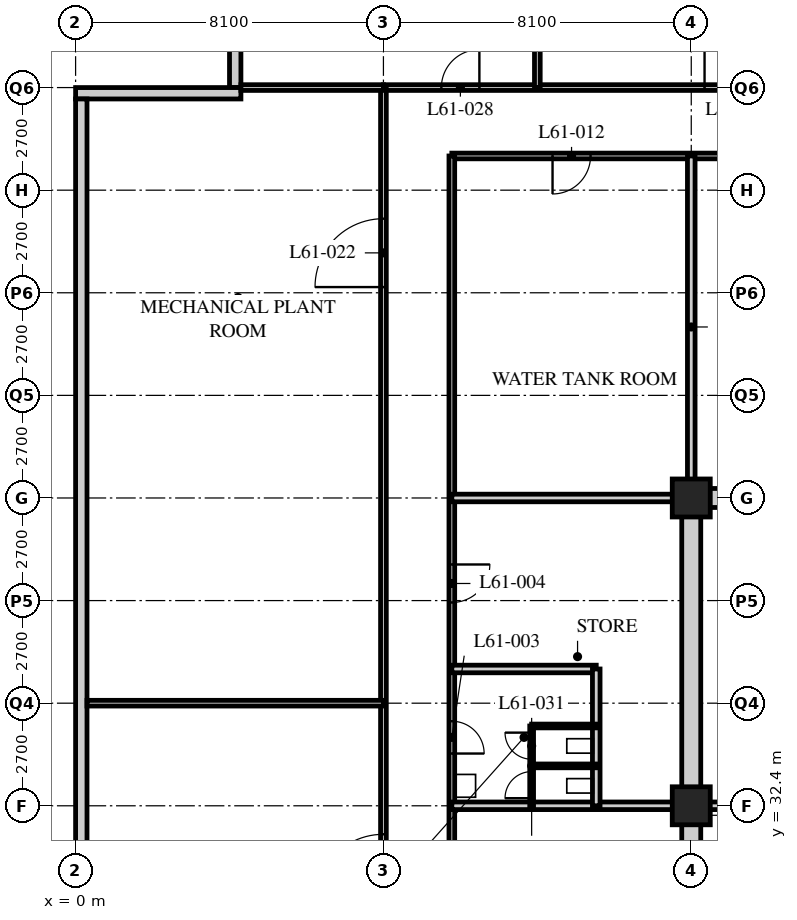
"""IFC4 building model, lengths in metres.
Left out: names, types, materials, properties, quantities, classifications, styles, units other than length and angle.
Written with IfcOpenShell. Run it as: python <this file> out.ifc"""

import sys

from ifc_helpers import new_model, si_unit, direction, frame, frame_2d, origin, origin_2d, place, context, subcontext, project, spatial, rectangle, hollow_rectangle, extrude, element, fill, save


model = new_model("IFC4")
c1 = context("Model", 3, precision=1e-05, world=origin(), true_north=direction((0.0, 1.0)))
c2 = subcontext(c1, "Body", "Model", "MODEL_VIEW")
j1 = project(units=[si_unit("LENGTHUNIT", "METRE"), si_unit("PLANEANGLEUNIT", "RADIAN")], contexts=[c1])
p1 = place(None, origin())
s1 = spatial("IfcSite", under=j1, at=p1, CompositionType="ELEMENT")
p2 = place(p1, origin())
s2 = spatial("IfcBuilding", under=s1, at=p2, CompositionType="ELEMENT")
p3 = place(p2, frame((0.0, 0.0, 235.2)))
s3 = spatial("IfcBuildingStorey", under=s2, at=p3, CompositionType="ELEMENT", Elevation=235.2)
for number, where, z_axis, x_axis in (
    (1, (16.2, 32.4, 0.0), (0.0, 0.0, 1.0), (1.0, 0.0, 0.0)),
    (2, (16.2, 40.5, 0.0), (0.0, 0.0, 1.0), (1.0, 0.0, 0.0)),
):
    element("IfcColumn", number, at=place(p3, frame(where, z_axis=z_axis, x_axis=x_axis)), inside=s3, PredefinedType="COLUMN", context=c2, shape_type="SweptSolid", body=[
        extrude(hollow_rectangle(XDim=1.0, YDim=1.0, WallThickness=0.1, at=origin_2d()), origin(), (0.0, 0.0, 1.0), 7.2),
    ])
p4 = place(p3, frame((4.2, 55.05, 0.0), z_axis=(0.0, 0.0, 1.0), x_axis=(0.0, -1.0, 0.0)))
e3 = element("IfcWall", 3, at=p4, inside=s3, PredefinedType="SOLIDWALL", context=c2, shape_type="SweptSolid", body=[
    extrude(rectangle(XDim=3.75, YDim=0.3, at=frame_2d((1.875, 0.0))), origin(), (0.0, 0.0, 1.0), 6.95),
])
p5 = place(p3, frame((4.35, 51.15, 0.0), z_axis=(0.0, 0.0, 1.0), x_axis=(-1.0, 0.0, 0.0)))
e4 = element("IfcWall", 4, at=p5, inside=s3, PredefinedType="SOLIDWALL", context=c2, shape_type="SweptSolid", body=[
    extrude(rectangle(XDim=4.35, YDim=0.3, at=frame_2d((2.175, 0.0))), origin(), (0.0, 0.0, 1.0), 6.95),
])
p6 = place(p3, frame((0.15, 51.0, 0.0), z_axis=(0.0, 0.0, 1.0), x_axis=(0.0, -1.0, 0.0)))
e5 = element("IfcWall", 5, at=p6, inside=s3, PredefinedType="SOLIDWALL", context=c2, shape_type="SweptSolid", body=[
    extrude(rectangle(XDim=32.1, YDim=0.3, at=frame_2d((16.05, 0.0))), origin(), (0.0, 0.0, 1.0), 5.95),
])
p7 = place(p3, frame((8.1, 51.3, 0.0), z_axis=(0.0, 0.0, 1.0), x_axis=(1.0, 0.0, 0.0)))
e6 = element("IfcWall", 6, at=p7, inside=s3, PredefinedType="PARTITIONING", context=c2, shape_type="SweptSolid", body=[
    extrude(rectangle(XDim=40.5, YDim=0.15, at=frame_2d((20.25, 0.0))), origin(), (0.0, 0.0, 1.0), 6.95),
])
p8 = place(p7, frame((8.45, 0.0, 0.0)))
e7 = element("IfcOpeningElement", 7, at=p8, cuts=e6, PredefinedType="OPENING", context=c2, shape_type="SweptSolid", body=[
    extrude(rectangle(XDim=1.8, YDim=2.4, at=frame_2d((0.9, 1.2))), frame((0.0, 0.085, 0.0), z_axis=(0.0, -1.0, 0.0), x_axis=(1.0, 0.0, 0.0)), (0.0, 0.0, 1.0), 0.17),
])
p9 = place(p7, frame((19.35, 0.0, 0.0)))
e8 = element("IfcOpeningElement", 8, at=p9, cuts=e6, PredefinedType="OPENING", context=c2, shape_type="SweptSolid", body=[
    extrude(rectangle(XDim=1.8, YDim=2.4, at=frame_2d((0.9, 1.2))), frame((0.0, 0.085, 0.0), z_axis=(0.0, -1.0, 0.0), x_axis=(1.0, 0.0, 0.0)), (0.0, 0.0, 1.0), 0.17),
])
p10 = place(p7, frame((33.0, 0.0, 0.0)))
e9 = element("IfcOpeningElement", 9, at=p10, cuts=e6, PredefinedType="OPENING", context=c2, shape_type="SweptSolid", body=[
    extrude(rectangle(XDim=1.8, YDim=2.4, at=frame_2d((0.9, 1.2))), frame((0.0, 0.085, 0.0), z_axis=(0.0, -1.0, 0.0), x_axis=(1.0, 0.0, 0.0)), (0.0, 0.0, 1.0), 0.17),
])
p11 = place(p7, frame((37.975, 0.0, 0.0)))
e10 = element("IfcOpeningElement", 10, at=p11, cuts=e6, PredefinedType="OPENING", context=c2, shape_type="SweptSolid", body=[
    extrude(rectangle(XDim=1.0, YDim=2.1, at=frame_2d((0.5, 1.05))), frame((0.0, 0.085, 0.0), z_axis=(0.0, -1.0, 0.0), x_axis=(1.0, 0.0, 0.0)), (0.0, 0.0, 1.0), 0.17),
])
p12 = place(p7, frame((1.525, 0.0, 0.0)))
e11 = element("IfcOpeningElement", 11, at=p12, cuts=e6, PredefinedType="OPENING", context=c2, shape_type="SweptSolid", body=[
    extrude(rectangle(XDim=1.0, YDim=2.1, at=frame_2d((0.5, 1.05))), frame((0.0, 0.085, 0.0), z_axis=(0.0, -1.0, 0.0), x_axis=(1.0, 0.0, 0.0)), (0.0, 0.0, 1.0), 0.17),
])
p13 = place(p3, frame((8.1, 18.9, 0.0), z_axis=(0.0, 0.0, 1.0), x_axis=(0.0, 1.0, 0.0)))
e12 = element("IfcWall", 12, at=p13, inside=s3, PredefinedType="PARTITIONING", context=c2, shape_type="SweptSolid", body=[
    extrude(rectangle(XDim=32.4, YDim=0.15, at=frame_2d((16.2, 0.0))), origin(), (0.0, 0.0, 1.0), 5.95),
])
p14 = place(p13, frame((10.95, 0.0, 0.0)))
e13 = element("IfcOpeningElement", 13, at=p14, cuts=e12, PredefinedType="OPENING", context=c2, shape_type="SweptSolid", body=[
    extrude(rectangle(XDim=1.8, YDim=2.4, at=frame_2d((0.9, 1.2))), frame((0.0, 0.085, 0.0), z_axis=(0.0, -1.0, 0.0), x_axis=(1.0, 0.0, 0.0)), (0.0, 0.0, 1.0), 0.17),
])
p15 = place(p13, frame((27.15, 0.0, 0.0)))
e14 = element("IfcOpeningElement", 14, at=p15, cuts=e12, PredefinedType="OPENING", context=c2, shape_type="SweptSolid", body=[
    extrude(rectangle(XDim=1.8, YDim=2.4, at=frame_2d((0.9, 1.2))), frame((0.0, 0.085, 0.0), z_axis=(0.0, -1.0, 0.0), x_axis=(1.0, 0.0, 0.0)), (0.0, 0.0, 1.0), 0.17),
])
p16 = place(p3, frame((27.14, 49.5, 0.0), z_axis=(0.0, 0.0, 1.0), x_axis=(-1.0, 0.0, 0.0)))
e15 = element("IfcWall", 15, at=p16, inside=s3, PredefinedType="PARTITIONING", context=c2, shape_type="SweptSolid", body=[
    extrude(rectangle(XDim=17.24, YDim=0.15, at=frame_2d((8.62, 0.0))), origin(), (0.0, 0.0, 1.0), 6.95),
])
p17 = place(p16, frame((13.59, 0.0, 0.0)))
e16 = element("IfcOpeningElement", 16, at=p17, cuts=e15, PredefinedType="OPENING", context=c2, shape_type="SweptSolid", body=[
    extrude(rectangle(XDim=1.0, YDim=2.1, at=frame_2d((0.5, 1.05))), frame((0.0, 0.085, 0.0), z_axis=(0.0, -1.0, 0.0), x_axis=(1.0, 0.0, 0.0)), (0.0, 0.0, 1.0), 0.17),
])
p18 = place(p16, frame((4.965, 0.0, 0.0)))
e17 = element("IfcOpeningElement", 17, at=p18, cuts=e15, PredefinedType="OPENING", context=c2, shape_type="SweptSolid", body=[
    extrude(rectangle(XDim=1.0, YDim=2.1, at=frame_2d((0.5, 1.05))), frame((0.0, 0.085, 0.0), z_axis=(0.0, -1.0, 0.0), x_axis=(1.0, 0.0, 0.0)), (0.0, 0.0, 1.0), 0.17),
])
p19 = place(p3, frame((9.9, 49.5, 0.0), z_axis=(0.0, 0.0, 1.0), x_axis=(0.0, -1.0, 0.0)))
e18 = element("IfcWall", 18, at=p19, inside=s3, PredefinedType="PARTITIONING", context=c2, shape_type="SweptSolid", body=[
    extrude(rectangle(XDim=28.8, YDim=0.15, at=frame_2d((14.4, 0.0))), origin(), (0.0, 0.0, 1.0), 6.95),
])
p20 = place(p19, frame((22.975, 0.0, 0.0)))
e19 = element("IfcOpeningElement", 19, at=p20, cuts=e18, PredefinedType="OPENING", context=c2, shape_type="SweptSolid", body=[
    extrude(rectangle(XDim=0.85, YDim=2.1, at=frame_2d((0.425, 1.05))), frame((0.0, 0.085, 0.0), z_axis=(0.0, -1.0, 0.0), x_axis=(1.0, 0.0, 0.0)), (0.0, 0.0, 1.0), 0.17),
])
p21 = place(p19, frame((18.85, 0.0, 0.0)))
e20 = element("IfcOpeningElement", 20, at=p21, cuts=e18, PredefinedType="OPENING", context=c2, shape_type="SweptSolid", body=[
    extrude(rectangle(XDim=1.0, YDim=2.1, at=frame_2d((0.5, 1.05))), frame((0.0, 0.085, 0.0), z_axis=(0.0, -1.0, 0.0), x_axis=(1.0, 0.0, 0.0)), (0.0, 0.0, 1.0), 0.17),
])
p22 = place(p19, frame((14.875, 0.0, 0.0)))
e21 = element("IfcOpeningElement", 21, at=p22, cuts=e18, PredefinedType="OPENING", context=c2, shape_type="SweptSolid", body=[
    extrude(rectangle(XDim=0.85, YDim=2.1, at=frame_2d((0.425, 1.05))), frame((0.0, 0.085, 0.0), z_axis=(0.0, -1.0, 0.0), x_axis=(1.0, 0.0, 0.0)), (0.0, 0.0, 1.0), 0.17),
])
p23 = place(p19, frame((10.75, 0.0, 0.0)))
e22 = element("IfcOpeningElement", 22, at=p23, cuts=e18, PredefinedType="OPENING", context=c2, shape_type="SweptSolid", body=[
    extrude(rectangle(XDim=1.0, YDim=2.1, at=frame_2d((0.5, 1.05))), frame((0.0, 0.085, 0.0), z_axis=(0.0, -1.0, 0.0), x_axis=(1.0, 0.0, 0.0)), (0.0, 0.0, 1.0), 0.17),
])
p24 = place(p3, frame((9.9, 32.4, 0.0), z_axis=(0.0, 0.0, 1.0), x_axis=(1.0, 0.0, 0.0)))
e23 = element("IfcWall", 23, at=p24, inside=s3, PredefinedType="SOLIDWALL", context=c2, shape_type="SweptSolid", body=[
    extrude(rectangle(XDim=6.3, YDim=0.2, at=frame_2d((3.15, 0.0))), origin(), (0.0, 0.0, 1.0), 6.25),
])
p25 = place(p3, frame((9.9, 36.0, 0.0), z_axis=(0.0, 0.0, 1.0), x_axis=(1.0, 0.0, 0.0)))
e24 = element("IfcWall", 24, at=p25, inside=s3, PredefinedType="SOLIDWALL", context=c2, shape_type="SweptSolid", body=[
    extrude(rectangle(XDim=3.8, YDim=0.2, at=frame_2d((1.9, 0.0))), origin(), (0.0, 0.0, 1.0), 6.95),
])
p26 = place(p3, frame((13.7, 32.4, 0.0), z_axis=(0.0, 0.0, 1.0), x_axis=(0.0, 1.0, 0.0)))
e25 = element("IfcWall", 25, at=p26, inside=s3, PredefinedType="SOLIDWALL", context=c2, shape_type="SweptSolid", body=[
    extrude(rectangle(XDim=3.6, YDim=0.2, at=frame_2d((1.8, 0.0))), origin(), (0.0, 0.0, 1.0), 6.95),
])
p27 = place(p3, frame((16.2, 40.5, 0.0), z_axis=(0.0, 0.0, 1.0), x_axis=(0.0, 1.0, 0.0)))
e26 = element("IfcWall", 26, at=p27, inside=s3, PredefinedType="SOLIDWALL", context=c2, shape_type="SweptSolid", body=[
    extrude(rectangle(XDim=9.0, YDim=0.2, at=frame_2d((4.5, 0.0))), origin(), (0.0, 0.0, 1.0), 5.95),
])
p28 = place(p3, frame((9.9, 40.5, 0.0), z_axis=(0.0, 0.0, 1.0), x_axis=(1.0, 0.0, 0.0)))
e27 = element("IfcWall", 27, at=p28, inside=s3, PredefinedType="SOLIDWALL", context=c2, shape_type="SweptSolid", body=[
    extrude(rectangle(XDim=6.3, YDim=0.2, at=frame_2d((3.15, 0.0))), origin(), (0.0, 0.0, 1.0), 6.25),
])
p29 = place(p3, frame((8.1, 35.1, 0.0), z_axis=(0.0, 0.0, 1.0), x_axis=(-1.0, 0.0, 0.0)))
e28 = element("IfcWall", 28, at=p29, inside=s3, PredefinedType="PARTITIONING", context=c2, shape_type="SweptSolid", body=[
    extrude(rectangle(XDim=7.8, YDim=0.15, at=frame_2d((3.9, 0.0))), origin(), (0.0, 0.0, 1.0), 6.95),
])
p30 = place(p3, frame((4.35, 51.3, 0.0), z_axis=(0.0, 0.0, 1.0), x_axis=(1.0, 0.0, 0.0)))
e29 = element("IfcWall", 29, at=p30, inside=s3, PredefinedType="PARTITIONING", context=c2, shape_type="SweptSolid", body=[
    extrude(rectangle(XDim=3.75, YDim=0.15, at=frame_2d((1.875, 0.0))), origin(), (0.0, 0.0, 1.0), 6.95),
])
p31 = place(p3, frame((12.15, 51.3, 0.0), z_axis=(0.0, 0.0, 1.0), x_axis=(0.0, 1.0, 0.0)))
e30 = element("IfcWall", 30, at=p31, inside=s3, PredefinedType="PARTITIONING", context=c2, shape_type="SweptSolid", body=[
    extrude(rectangle(XDim=7.8, YDim=0.15, at=frame_2d((3.9, 0.0))), origin(), (0.0, 0.0, 1.0), 6.95),
])
p32 = place(p3, frame((12.0, 32.4, 0.0), z_axis=(0.0, 0.0, 1.0), x_axis=(0.0, 1.0, 0.0)))
e31 = element("IfcWall", 31, at=p32, inside=s3, PredefinedType="PARTITIONING", context=c2, shape_type="SweptSolid", body=[
    extrude(rectangle(XDim=2.1, YDim=0.1, at=frame_2d((1.05, 0.0))), origin(), (0.0, 0.0, 1.0), 6.95),
])
p33 = place(p32, frame((0.2, 0.0, 0.0)))
e32 = element("IfcOpeningElement", 32, at=p33, cuts=e31, PredefinedType="OPENING", context=c2, shape_type="SweptSolid", body=[
    extrude(rectangle(XDim=0.7, YDim=2.0, at=frame_2d((0.35, 1.0))), frame((0.0, 0.06, 0.0), z_axis=(0.0, -1.0, 0.0), x_axis=(1.0, 0.0, 0.0)), (0.0, 0.0, 1.0), 0.12),
])
p34 = place(p32, frame((1.225, 0.0, 0.0)))
e33 = element("IfcOpeningElement", 33, at=p34, cuts=e31, PredefinedType="OPENING", context=c2, shape_type="SweptSolid", body=[
    extrude(rectangle(XDim=0.7, YDim=2.0, at=frame_2d((0.35, 1.0))), frame((0.0, 0.06, 0.0), z_axis=(0.0, -1.0, 0.0), x_axis=(1.0, 0.0, 0.0)), (0.0, 0.0, 1.0), 0.12),
])
for number, where, z_axis, x_axis in (
    (34, (12.0, 33.45, 0.0), (0.0, 0.0, 1.0), (1.0, 0.0, 0.0)),
    (35, (12.0, 34.5, 0.0), (0.0, 0.0, 1.0), (1.0, 0.0, 0.0)),
):
    element("IfcWall", number, at=place(p3, frame(where, z_axis=z_axis, x_axis=x_axis)), inside=s3, PredefinedType="PARTITIONING", context=c2, shape_type="SweptSolid", body=[
        extrude(rectangle(XDim=1.7, YDim=0.1, at=frame_2d((0.85, 0.0))), origin(), (0.0, 0.0, 1.0), 6.95),
    ])
p35 = place(p3, frame((15.95, 40.5, 0.0), z_axis=(0.0, 0.0, 1.0), x_axis=(1.0, 0.0, 0.0)))
e36 = element("IfcWall", 36, at=p35, inside=s3, PredefinedType="SOLIDWALL", context=c2, shape_type="SweptSolid", body=[
    extrude(rectangle(XDim=24.8, YDim=0.5, at=frame_2d((12.4, 0.0))), origin(), (0.0, 0.0, 1.0), 6.188),
])
p36 = place(p35, frame((11.5, 0.0, 0.0)))
e37 = element("IfcOpeningElement", 37, at=p36, cuts=e36, PredefinedType="OPENING", context=c2, shape_type="SweptSolid", body=[
    extrude(rectangle(XDim=1.8, YDim=2.4, at=frame_2d((0.9, 1.2))), frame((0.0, 0.26, 0.0), z_axis=(0.0, -1.0, 0.0), x_axis=(1.0, 0.0, 0.0)), (0.0, 0.0, 1.0), 0.52),
])
p37 = place(p3, frame((16.2, 24.55, 0.0), z_axis=(0.0, 0.0, 1.0), x_axis=(0.0, 1.0, 0.0)))
e38 = element("IfcWall", 38, at=p37, inside=s3, PredefinedType="SOLIDWALL", context=c2, shape_type="SweptSolid", body=[
    extrude(rectangle(XDim=15.7, YDim=0.5, at=frame_2d((7.85, 0.0))), origin(), (0.0, 0.0, 1.0), 5.95),
])
p38 = place(p3, frame((16.45, 32.4, 0.0), z_axis=(0.0, 0.0, 1.0), x_axis=(1.0, 0.0, 0.0)))
e39 = element("IfcWall", 39, at=p38, inside=s3, PredefinedType="SOLIDWALL", context=c2, shape_type="SweptSolid", body=[
    extrude(rectangle(XDim=7.95, YDim=0.2, at=frame_2d((3.975, 0.0))), origin(), (0.0, 0.0, 1.0), 6.25),
])
p39 = place(p22, origin())
e40 = element("IfcDoor", 40, at=p39, inside=s3, OperationType="SINGLE_SWING_RIGHT", PredefinedType="DOOR", context=c2, shape_type="SweptSolid", body=[
    extrude(rectangle(XDim=0.85, YDim=2.1, at=frame_2d((0.425, 1.05))), frame((0.0, 0.025, 0.0), z_axis=(0.0, -1.0, 0.0), x_axis=(1.0, 0.0, 0.0)), (0.0, 0.0, 1.0), 0.05),
])
fill(e21, e40)
p40 = place(p23, origin())
e41 = element("IfcDoor", 41, at=p40, inside=s3, OperationType="SINGLE_SWING_LEFT", PredefinedType="DOOR", context=c2, shape_type="SweptSolid", body=[
    extrude(rectangle(XDim=1.0, YDim=2.1, at=frame_2d((0.5, 1.05))), frame((0.0, 0.025, 0.0), z_axis=(0.0, -1.0, 0.0), x_axis=(1.0, 0.0, 0.0)), (0.0, 0.0, 1.0), 0.05),
])
fill(e22, e41)
p41 = place(p17, origin())
e42 = element("IfcDoor", 42, at=p41, inside=s3, OperationType="SINGLE_SWING_RIGHT", PredefinedType="DOOR", context=c2, shape_type="SweptSolid", body=[
    extrude(rectangle(XDim=1.0, YDim=2.1, at=frame_2d((0.5, 1.05))), frame((0.0, 0.025, 0.0), z_axis=(0.0, -1.0, 0.0), x_axis=(1.0, 0.0, 0.0)), (0.0, 0.0, 1.0), 0.05),
])
fill(e16, e42)
p42 = place(p8, origin())
e43 = element("IfcDoor", 43, at=p42, inside=s3, OperationType="DOUBLE_DOOR_SINGLE_SWING", PredefinedType="DOOR", context=c2, shape_type="SweptSolid", body=[
    extrude(rectangle(XDim=1.8, YDim=2.4, at=frame_2d((0.9, 1.2))), frame((0.0, 0.025, 0.0), z_axis=(0.0, -1.0, 0.0), x_axis=(1.0, 0.0, 0.0)), (0.0, 0.0, 1.0), 0.05),
])
fill(e7, e43)
p43 = place(p14, origin())
e44 = element("IfcDoor", 44, at=p43, inside=s3, OperationType="DOUBLE_DOOR_SINGLE_SWING", PredefinedType="DOOR", context=c2, shape_type="SweptSolid", body=[
    extrude(rectangle(XDim=1.8, YDim=2.4, at=frame_2d((0.9, 1.2))), frame((0.0, 0.025, 0.0), z_axis=(0.0, -1.0, 0.0), x_axis=(1.0, 0.0, 0.0)), (0.0, 0.0, 1.0), 0.05),
])
fill(e13, e44)
p44 = place(p15, origin())
e45 = element("IfcDoor", 45, at=p44, inside=s3, OperationType="DOUBLE_DOOR_SINGLE_SWING", PredefinedType="DOOR", context=c2, shape_type="SweptSolid", body=[
    extrude(rectangle(XDim=1.8, YDim=2.4, at=frame_2d((0.9, 1.2))), frame((0.0, 0.025, 0.0), z_axis=(0.0, -1.0, 0.0), x_axis=(1.0, 0.0, 0.0)), (0.0, 0.0, 1.0), 0.05),
])
fill(e14, e45)
p45 = place(p12, origin())
e46 = element("IfcDoor", 46, at=p45, inside=s3, OperationType="SINGLE_SWING_RIGHT", PredefinedType="DOOR", context=c2, shape_type="SweptSolid", body=[
    extrude(rectangle(XDim=1.0, YDim=2.1, at=frame_2d((0.5, 1.05))), frame((0.0, 0.025, 0.0), z_axis=(0.0, -1.0, 0.0), x_axis=(1.0, 0.0, 0.0)), (0.0, 0.0, 1.0), 0.05),
])
fill(e11, e46)
p46 = place(p33, origin())
e47 = element("IfcDoor", 47, at=p46, inside=s3, OperationType="SINGLE_SWING_LEFT", PredefinedType="DOOR", context=c2, shape_type="SweptSolid", body=[
    extrude(rectangle(XDim=0.7, YDim=2.0, at=frame_2d((0.35, 1.0))), frame((0.0, 0.025, 0.0), z_axis=(0.0, -1.0, 0.0), x_axis=(1.0, 0.0, 0.0)), (0.0, 0.0, 1.0), 0.05),
])
fill(e32, e47)
p47 = place(p34, origin())
e48 = element("IfcDoor", 48, at=p47, inside=s3, OperationType="SINGLE_SWING_RIGHT", PredefinedType="DOOR", context=c2, shape_type="SweptSolid", body=[
    extrude(rectangle(XDim=0.7, YDim=2.0, at=frame_2d((0.35, 1.0))), frame((0.0, 0.025, 0.0), z_axis=(0.0, -1.0, 0.0), x_axis=(1.0, 0.0, 0.0)), (0.0, 0.0, 1.0), 0.05),
])
fill(e33, e48)
save(model, sys.argv[1])
